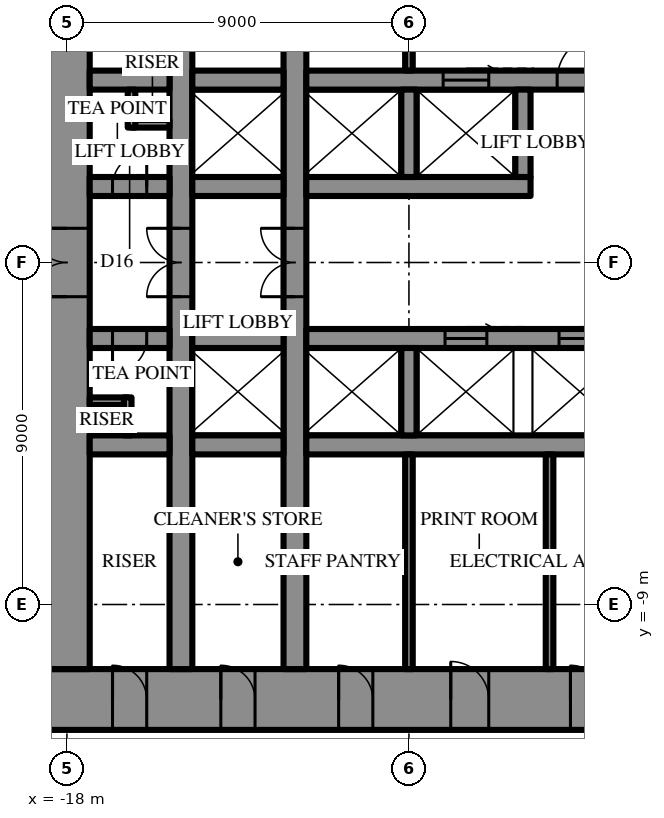
"""IFC4 building model, lengths in metres.
Left out: names, types, materials, properties, quantities, classifications, styles, units other than length and angle.
Written with IfcOpenShell. Run it as: python <this file> out.ifc"""

import sys

from ifc_helpers import new_model, si_unit, direction, frame, frame_2d, origin, place, context, subcontext, project, spatial, rectangle, extrude, element, fill, save


model = new_model("IFC4")
c1 = context("Model", 3, precision=1e-05, world=origin(), true_north=direction((0.0, 1.0)))
c2 = subcontext(c1, "Body", "Model", "MODEL_VIEW")
j1 = project(units=[si_unit("LENGTHUNIT", "METRE"), si_unit("PLANEANGLEUNIT", "RADIAN")], contexts=[c1])
p1 = place(None, origin())
s1 = spatial("IfcSite", under=j1, at=p1, CompositionType="ELEMENT")
p2 = place(p1, origin())
s2 = spatial("IfcBuilding", under=s1, at=p2, CompositionType="ELEMENT")
p3 = place(p2, frame((0.0, 0.0, 165.7)))
s3 = spatial("IfcBuildingStorey", under=s2, at=p3, CompositionType="ELEMENT", Elevation=165.7)
p4 = place(p3, frame((18.6, -11.5, 0.0), z_axis=(0.0, 0.0, 1.0), x_axis=(-1.0, 0.0, 0.0)))
e1 = element("IfcWall", 1, at=p4, inside=s3, PredefinedType="SHEAR", context=c2, shape_type="SweptSolid", body=[
    extrude(rectangle(XDim=37.2, YDim=1.6, at=frame_2d((18.6, 0.0))), origin(), (0.0, 0.0, 1.0), 4.2),
])
p5 = place(p4, frame((19.45, 0.0, 0.0)))
e2 = element("IfcOpeningElement", 2, at=p5, cuts=e1, PredefinedType="OPENING", context=c2, shape_type="SweptSolid", body=[
    extrude(rectangle(XDim=0.9, YDim=2.2, at=frame_2d((0.45, 1.1))), frame((0.0, 0.81, 0.0), z_axis=(0.0, -1.0, 0.0), x_axis=(1.0, 0.0, 0.0)), (0.0, 0.0, 1.0), 1.62),
])
p6 = place(p4, frame((22.45, 0.0, 0.0)))
e3 = element("IfcOpeningElement", 3, at=p6, cuts=e1, PredefinedType="OPENING", context=c2, shape_type="SweptSolid", body=[
    extrude(rectangle(XDim=0.9, YDim=2.2, at=frame_2d((0.45, 1.1))), frame((0.0, 0.81, 0.0), z_axis=(0.0, -1.0, 0.0), x_axis=(1.0, 0.0, 0.0)), (0.0, 0.0, 1.0), 1.62),
])
p7 = place(p4, frame((25.5, 0.0, 0.0)))
e4 = element("IfcOpeningElement", 4, at=p7, cuts=e1, PredefinedType="OPENING", context=c2, shape_type="SweptSolid", body=[
    extrude(rectangle(XDim=1.0, YDim=2.2, at=frame_2d((0.5, 1.1))), frame((0.0, 0.81, 0.0), z_axis=(0.0, -1.0, 0.0), x_axis=(1.0, 0.0, 0.0)), (0.0, 0.0, 1.0), 1.62),
])
p8 = place(p4, frame((1.8, 0.0, 0.0)))
e5 = element("IfcOpeningElement", 5, at=p8, cuts=e1, PredefinedType="OPENING", context=c2, shape_type="SweptSolid", body=[
    extrude(rectangle(XDim=0.9, YDim=2.2, at=frame_2d((0.45, 1.1))), frame((0.0, 0.81, 0.0), z_axis=(0.0, -1.0, 0.0), x_axis=(1.0, 0.0, 0.0)), (0.0, 0.0, 1.0), 1.62),
])
p9 = place(p4, frame((4.65, 0.0, 0.0)))
e6 = element("IfcOpeningElement", 6, at=p9, cuts=e1, PredefinedType="OPENING", context=c2, shape_type="SweptSolid", body=[
    extrude(rectangle(XDim=0.9, YDim=2.2, at=frame_2d((0.45, 1.1))), frame((0.0, 0.81, 0.0), z_axis=(0.0, -1.0, 0.0), x_axis=(1.0, 0.0, 0.0)), (0.0, 0.0, 1.0), 1.62),
])
p10 = place(p4, frame((7.75, 0.0, 0.0)))
e7 = element("IfcOpeningElement", 7, at=p10, cuts=e1, PredefinedType="OPENING", context=c2, shape_type="SweptSolid", body=[
    extrude(rectangle(XDim=0.9, YDim=2.2, at=frame_2d((0.45, 1.1))), frame((0.0, 0.81, 0.0), z_axis=(0.0, -1.0, 0.0), x_axis=(1.0, 0.0, 0.0)), (0.0, 0.0, 1.0), 1.62),
])
p11 = place(p4, frame((28.55, 0.0, 0.0)))
e8 = element("IfcOpeningElement", 8, at=p11, cuts=e1, PredefinedType="OPENING", context=c2, shape_type="SweptSolid", body=[
    extrude(rectangle(XDim=0.9, YDim=2.2, at=frame_2d((0.45, 1.1))), frame((0.0, 0.81, 0.0), z_axis=(0.0, -1.0, 0.0), x_axis=(1.0, 0.0, 0.0)), (0.0, 0.0, 1.0), 1.62),
])
p12 = place(p4, frame((31.65, 0.0, 0.0)))
e9 = element("IfcOpeningElement", 9, at=p12, cuts=e1, PredefinedType="OPENING", context=c2, shape_type="SweptSolid", body=[
    extrude(rectangle(XDim=0.9, YDim=2.2, at=frame_2d((0.45, 1.1))), frame((0.0, 0.81, 0.0), z_axis=(0.0, -1.0, 0.0), x_axis=(1.0, 0.0, 0.0)), (0.0, 0.0, 1.0), 1.62),
])
p13 = place(p4, frame((34.5, 0.0, 0.0)))
e10 = element("IfcOpeningElement", 10, at=p13, cuts=e1, PredefinedType="OPENING", context=c2, shape_type="SweptSolid", body=[
    extrude(rectangle(XDim=0.9, YDim=2.2, at=frame_2d((0.45, 1.1))), frame((0.0, 0.81, 0.0), z_axis=(0.0, -1.0, 0.0), x_axis=(1.0, 0.0, 0.0)), (0.0, 0.0, 1.0), 1.62),
])
p14 = place(p3, frame((-18.0, 10.7, 0.0), z_axis=(0.0, 0.0, 1.0), x_axis=(0.0, -1.0, 0.0)))
e11 = element("IfcWall", 11, at=p14, inside=s3, PredefinedType="SHEAR", context=c2, shape_type="SweptSolid", body=[
    extrude(rectangle(XDim=21.4, YDim=1.2, at=frame_2d((10.7, 0.0))), origin(), (0.0, 0.0, 1.0), 4.2),
])
p15 = place(p14, frame((9.8, 0.0, 0.0)))
e12 = element("IfcOpeningElement", 12, at=p15, cuts=e11, PredefinedType="OPENING", context=c2, shape_type="SweptSolid", body=[
    extrude(rectangle(XDim=1.8, YDim=2.4, at=frame_2d((0.9, 1.2))), frame((0.0, 0.61, 0.0), z_axis=(0.0, -1.0, 0.0), x_axis=(1.0, 0.0, 0.0)), (0.0, 0.0, 1.0), 1.22),
])
p16 = place(p3, frame((-12.0, -10.7, 0.0), z_axis=(0.0, 0.0, 1.0), x_axis=(0.0, 1.0, 0.0)))
e13 = element("IfcWall", 13, at=p16, inside=s3, PredefinedType="SHEAR", context=c2, shape_type="SweptSolid", body=[
    extrude(rectangle(XDim=21.4, YDim=0.6, at=frame_2d((10.7, 0.0))), origin(), (0.0, 0.0, 1.0), 4.2),
])
p17 = place(p16, frame((9.8, 0.0, 0.0)))
e14 = element("IfcOpeningElement", 14, at=p17, cuts=e13, PredefinedType="OPENING", context=c2, shape_type="SweptSolid", body=[
    extrude(rectangle(XDim=1.8, YDim=2.4, at=frame_2d((0.9, 1.2))), frame((0.0, 0.31, 0.0), z_axis=(0.0, -1.0, 0.0), x_axis=(1.0, 0.0, 0.0)), (0.0, 0.0, 1.0), 0.62),
])
p18 = place(p3, frame((-15.0, -10.7, 0.0), z_axis=(0.0, 0.0, 1.0), x_axis=(0.0, 1.0, 0.0)))
e15 = element("IfcWall", 15, at=p18, inside=s3, PredefinedType="SHEAR", context=c2, shape_type="SweptSolid", body=[
    extrude(rectangle(XDim=21.4, YDim=0.6, at=frame_2d((10.7, 0.0))), origin(), (0.0, 0.0, 1.0), 4.2),
])
p19 = place(p18, frame((9.8, 0.0, 0.0)))
e16 = element("IfcOpeningElement", 16, at=p19, cuts=e15, PredefinedType="OPENING", context=c2, shape_type="SweptSolid", body=[
    extrude(rectangle(XDim=1.8, YDim=2.4, at=frame_2d((0.9, 1.2))), frame((0.0, 0.31, 0.0), z_axis=(0.0, -1.0, 0.0), x_axis=(1.0, 0.0, 0.0)), (0.0, 0.0, 1.0), 0.62),
])
p20 = place(p3, frame((-17.4, 2.0, 0.0), z_axis=(0.0, 0.0, 1.0), x_axis=(1.0, 0.0, 0.0)))
e17 = element("IfcWall", 17, at=p20, inside=s3, PredefinedType="SHEAR", context=c2, shape_type="SweptSolid", body=[
    extrude(rectangle(XDim=2.1, YDim=0.5, at=frame_2d((1.05, 0.0))), origin(), (0.0, 0.0, 1.0), 4.2),
])
p21 = place(p20, frame((0.6, 0.0, 0.0)))
e18 = element("IfcOpeningElement", 18, at=p21, cuts=e17, PredefinedType="OPENING", context=c2, shape_type="SweptSolid", body=[
    extrude(rectangle(XDim=0.9, YDim=2.2, at=frame_2d((0.45, 1.1))), frame((0.0, 0.26, 0.0), z_axis=(0.0, -1.0, 0.0), x_axis=(1.0, 0.0, 0.0)), (0.0, 0.0, 1.0), 0.52),
])
p22 = place(p3, frame((-14.7, 2.0, 0.0), z_axis=(0.0, 0.0, 1.0), x_axis=(1.0, 0.0, 0.0)))
e19 = element("IfcWall", 19, at=p22, inside=s3, PredefinedType="SHEAR", context=c2, shape_type="SweptSolid", body=[
    extrude(rectangle(XDim=2.4, YDim=0.5, at=frame_2d((1.2, 0.0))), origin(), (0.0, 0.0, 1.0), 4.2),
])
p23 = place(p3, frame((-11.7, 2.0, 0.0), z_axis=(0.0, 0.0, 1.0), x_axis=(1.0, 0.0, 0.0)))
e20 = element("IfcWall", 20, at=p23, inside=s3, PredefinedType="SHEAR", context=c2, shape_type="SweptSolid", body=[
    extrude(rectangle(XDim=5.9, YDim=0.5, at=frame_2d((2.95, 0.0))), origin(), (0.0, 0.0, 1.0), 4.2),
])
p24 = place(p3, frame((-17.4, 4.8, 0.0), z_axis=(0.0, 0.0, 1.0), x_axis=(1.0, 0.0, 0.0)))
e21 = element("IfcWall", 21, at=p24, inside=s3, PredefinedType="SHEAR", context=c2, shape_type="SweptSolid", body=[
    extrude(rectangle(XDim=2.1, YDim=0.5, at=frame_2d((1.05, 0.0))), origin(), (0.0, 0.0, 1.0), 4.2),
])
p25 = place(p3, frame((-14.7, 4.8, 0.0), z_axis=(0.0, 0.0, 1.0), x_axis=(1.0, 0.0, 0.0)))
e22 = element("IfcWall", 22, at=p25, inside=s3, PredefinedType="SHEAR", context=c2, shape_type="SweptSolid", body=[
    extrude(rectangle(XDim=2.4, YDim=0.5, at=frame_2d((1.2, 0.0))), origin(), (0.0, 0.0, 1.0), 4.2),
])
p26 = place(p3, frame((-11.7, 4.8, 0.0), z_axis=(0.0, 0.0, 1.0), x_axis=(1.0, 0.0, 0.0)))
e23 = element("IfcWall", 23, at=p26, inside=s3, PredefinedType="SHEAR", context=c2, shape_type="SweptSolid", body=[
    extrude(rectangle(XDim=23.4, YDim=0.5, at=frame_2d((11.7, 0.0))), origin(), (0.0, 0.0, 1.0), 4.2),
])
p27 = place(p26, frame((6.6, 0.0, 0.0)))
e24 = element("IfcOpeningElement", 24, at=p27, cuts=e23, PredefinedType="OPENING", context=c2, shape_type="SweptSolid", body=[
    extrude(rectangle(XDim=1.2, YDim=2.2, at=frame_2d((0.6, 1.1))), frame((0.0, 0.26, 0.0), z_axis=(0.0, -1.0, 0.0), x_axis=(1.0, 0.0, 0.0)), (0.0, 0.0, 1.0), 0.52),
])
p28 = place(p26, frame((3.6, 0.0, 0.0)))
e25 = element("IfcOpeningElement", 25, at=p28, cuts=e23, PredefinedType="OPENING", context=c2, shape_type="SweptSolid", body=[
    extrude(rectangle(XDim=1.2, YDim=2.2, at=frame_2d((0.6, 1.1))), frame((0.0, 0.26, 0.0), z_axis=(0.0, -1.0, 0.0), x_axis=(1.0, 0.0, 0.0)), (0.0, 0.0, 1.0), 0.52),
])
for number, where, z_axis, x_axis in (
    (26, (-9.0, 2.25, 0.0), (0.0, 0.0, 1.0), (0.0, 1.0, 0.0)),
    (27, (-6.0, 2.25, 0.0), (0.0, 0.0, 1.0), (0.0, 1.0, 0.0)),
):
    element("IfcWall", number, at=place(p3, frame(where, z_axis=z_axis, x_axis=x_axis)), inside=s3, PredefinedType="SHEAR", context=c2, shape_type="SweptSolid", body=[
        extrude(rectangle(XDim=2.3, YDim=0.4, at=frame_2d((1.15, 0.0))), origin(), (0.0, 0.0, 1.0), 4.2),
    ])
p29 = place(p3, frame((3.2, -2.0, 0.0), z_axis=(0.0, 0.0, 1.0), x_axis=(-1.0, 0.0, 0.0)))
e28 = element("IfcWall", 28, at=p29, inside=s3, PredefinedType="SHEAR", context=c2, shape_type="SweptSolid", body=[
    extrude(rectangle(XDim=14.9, YDim=0.5, at=frame_2d((7.45, 0.0))), origin(), (0.0, 0.0, 1.0), 4.2),
])
p30 = place(p29, frame((1.15, 0.0, 0.0)))
e29 = element("IfcOpeningElement", 29, at=p30, cuts=e28, PredefinedType="OPENING", context=c2, shape_type="SweptSolid", body=[
    extrude(rectangle(XDim=1.1, YDim=2.2, at=frame_2d((0.55, 1.1))), frame((0.0, 0.26, 0.0), z_axis=(0.0, -1.0, 0.0), x_axis=(1.0, 0.0, 0.0)), (0.0, 0.0, 1.0), 0.52),
])
p31 = place(p29, frame((4.15, 0.0, 0.0)))
e30 = element("IfcOpeningElement", 30, at=p31, cuts=e28, PredefinedType="OPENING", context=c2, shape_type="SweptSolid", body=[
    extrude(rectangle(XDim=1.1, YDim=2.2, at=frame_2d((0.55, 1.1))), frame((0.0, 0.26, 0.0), z_axis=(0.0, -1.0, 0.0), x_axis=(1.0, 0.0, 0.0)), (0.0, 0.0, 1.0), 0.52),
])
p32 = place(p29, frame((7.15, 0.0, 0.0)))
e31 = element("IfcOpeningElement", 31, at=p32, cuts=e28, PredefinedType="OPENING", context=c2, shape_type="SweptSolid", body=[
    extrude(rectangle(XDim=1.1, YDim=2.2, at=frame_2d((0.55, 1.1))), frame((0.0, 0.26, 0.0), z_axis=(0.0, -1.0, 0.0), x_axis=(1.0, 0.0, 0.0)), (0.0, 0.0, 1.0), 0.52),
])
p33 = place(p29, frame((10.15, 0.0, 0.0)))
e32 = element("IfcOpeningElement", 32, at=p33, cuts=e28, PredefinedType="OPENING", context=c2, shape_type="SweptSolid", body=[
    extrude(rectangle(XDim=1.1, YDim=2.2, at=frame_2d((0.55, 1.1))), frame((0.0, 0.26, 0.0), z_axis=(0.0, -1.0, 0.0), x_axis=(1.0, 0.0, 0.0)), (0.0, 0.0, 1.0), 0.52),
])
p34 = place(p3, frame((-12.3, -2.0, 0.0), z_axis=(0.0, 0.0, 1.0), x_axis=(-1.0, 0.0, 0.0)))
e33 = element("IfcWall", 33, at=p34, inside=s3, PredefinedType="SHEAR", context=c2, shape_type="SweptSolid", body=[
    extrude(rectangle(XDim=2.4, YDim=0.5, at=frame_2d((1.2, 0.0))), origin(), (0.0, 0.0, 1.0), 4.2),
])
p35 = place(p3, frame((-15.3, -2.0, 0.0), z_axis=(0.0, 0.0, 1.0), x_axis=(-1.0, 0.0, 0.0)))
e34 = element("IfcWall", 34, at=p35, inside=s3, PredefinedType="SHEAR", context=c2, shape_type="SweptSolid", body=[
    extrude(rectangle(XDim=2.1, YDim=0.5, at=frame_2d((1.05, 0.0))), origin(), (0.0, 0.0, 1.0), 4.2),
])
p36 = place(p35, frame((0.6, 0.0, 0.0)))
e35 = element("IfcOpeningElement", 35, at=p36, cuts=e34, PredefinedType="OPENING", context=c2, shape_type="SweptSolid", body=[
    extrude(rectangle(XDim=0.9, YDim=2.2, at=frame_2d((0.45, 1.1))), frame((0.0, 0.26, 0.0), z_axis=(0.0, -1.0, 0.0), x_axis=(1.0, 0.0, 0.0)), (0.0, 0.0, 1.0), 0.52),
])
p37 = place(p3, frame((11.7, -4.8, 0.0), z_axis=(0.0, 0.0, 1.0), x_axis=(-1.0, 0.0, 0.0)))
e36 = element("IfcWall", 36, at=p37, inside=s3, PredefinedType="SHEAR", context=c2, shape_type="SweptSolid", body=[
    extrude(rectangle(XDim=23.4, YDim=0.5, at=frame_2d((11.7, 0.0))), origin(), (0.0, 0.0, 1.0), 4.2),
])
p38 = place(p37, frame((6.6, 0.0, 0.0)))
e37 = element("IfcOpeningElement", 37, at=p38, cuts=e36, PredefinedType="OPENING", context=c2, shape_type="SweptSolid", body=[
    extrude(rectangle(XDim=1.2, YDim=2.2, at=frame_2d((0.6, 1.1))), frame((0.0, 0.26, 0.0), z_axis=(0.0, -1.0, 0.0), x_axis=(1.0, 0.0, 0.0)), (0.0, 0.0, 1.0), 0.52),
])
p39 = place(p37, frame((3.6, 0.0, 0.0)))
e38 = element("IfcOpeningElement", 38, at=p39, cuts=e36, PredefinedType="OPENING", context=c2, shape_type="SweptSolid", body=[
    extrude(rectangle(XDim=1.2, YDim=2.2, at=frame_2d((0.6, 1.1))), frame((0.0, 0.26, 0.0), z_axis=(0.0, -1.0, 0.0), x_axis=(1.0, 0.0, 0.0)), (0.0, 0.0, 1.0), 0.52),
])
p40 = place(p3, frame((-12.3, -4.8, 0.0), z_axis=(0.0, 0.0, 1.0), x_axis=(-1.0, 0.0, 0.0)))
e39 = element("IfcWall", 39, at=p40, inside=s3, PredefinedType="SHEAR", context=c2, shape_type="SweptSolid", body=[
    extrude(rectangle(XDim=2.4, YDim=0.5, at=frame_2d((1.2, 0.0))), origin(), (0.0, 0.0, 1.0), 4.2),
])
p41 = place(p3, frame((-15.3, -4.8, 0.0), z_axis=(0.0, 0.0, 1.0), x_axis=(-1.0, 0.0, 0.0)))
e40 = element("IfcWall", 40, at=p41, inside=s3, PredefinedType="SHEAR", context=c2, shape_type="SweptSolid", body=[
    extrude(rectangle(XDim=2.1, YDim=0.5, at=frame_2d((1.05, 0.0))), origin(), (0.0, 0.0, 1.0), 4.2),
])
p42 = place(p3, frame((-9.0, -2.25, 0.0), z_axis=(0.0, 0.0, 1.0), x_axis=(0.0, -1.0, 0.0)))
e41 = element("IfcWall", 41, at=p42, inside=s3, PredefinedType="SHEAR", context=c2, shape_type="SweptSolid", body=[
    extrude(rectangle(XDim=2.3, YDim=0.4, at=frame_2d((1.15, 0.0))), origin(), (0.0, 0.0, 1.0), 4.2),
])
for number, where, z_axis, x_axis in (
    (42, (-9.0, 5.05, 0.0), (0.0, 0.0, 1.0), (0.0, 1.0, 0.0)),
    (43, (-9.0, -5.05, 0.0), (0.0, 0.0, 1.0), (0.0, -1.0, 0.0)),
    (44, (-5.3, -5.05, 0.0), (0.0, 0.0, 1.0), (0.0, -1.0, 0.0)),
):
    element("IfcWall", number, at=place(p3, frame(where, z_axis=z_axis, x_axis=x_axis)), inside=s3, PredefinedType="PARTITIONING", context=c2, shape_type="SweptSolid", body=[
        extrude(rectangle(XDim=5.65, YDim=0.2, at=frame_2d((2.825, 0.0))), origin(), (0.0, 0.0, 1.0), 4.0),
    ])
for number, where, z_axis, x_axis in (
    (45, (-16.3, 3.65, 0.0), (0.0, 0.0, 1.0), (1.0, 0.0, 0.0)),
    (46, (-16.3, 3.55, 0.0), (0.0, 0.0, 1.0), (0.0, 1.0, 0.0)),
    (47, (-16.4, -3.65, 0.0), (0.0, 0.0, 1.0), (-1.0, 0.0, 0.0)),
    (48, (-16.4, -3.55, 0.0), (0.0, 0.0, 1.0), (0.0, -1.0, 0.0)),
):
    element("IfcWall", number, at=place(p3, frame(where, z_axis=z_axis, x_axis=x_axis)), inside=s3, PredefinedType="PARTITIONING", context=c2, shape_type="SweptSolid", body=[
        extrude(rectangle(XDim=1.0, YDim=0.2, at=frame_2d((0.5, 0.0))), origin(), (0.0, 0.0, 1.0), 4.0),
    ])
p43 = place(p15, frame((1.8, 0.0, 0.0), z_axis=(0.0, 0.0, 1.0), x_axis=(-1.0, 0.0, 0.0)))
e49 = element("IfcDoor", 49, at=p43, inside=s3, OperationType="DOUBLE_DOOR_SINGLE_SWING", PredefinedType="DOOR", context=c2, shape_type="SweptSolid", body=[
    extrude(rectangle(XDim=1.8, YDim=2.4, at=frame_2d((0.9, 1.2))), frame((0.0, 0.025, 0.0), z_axis=(0.0, -1.0, 0.0), x_axis=(1.0, 0.0, 0.0)), (0.0, 0.0, 1.0), 0.05),
])
fill(e12, e49)
p44 = place(p27, origin())
e50 = element("IfcDoor", 50, at=p44, inside=s3, OperationType="SINGLE_SWING_LEFT", PredefinedType="DOOR", context=c2, shape_type="SweptSolid", body=[
    extrude(rectangle(XDim=1.2, YDim=2.2, at=frame_2d((0.6, 1.1))), frame((0.0, 0.025, 0.0), z_axis=(0.0, -1.0, 0.0), x_axis=(1.0, 0.0, 0.0)), (0.0, 0.0, 1.0), 0.05),
])
fill(e24, e50)
p45 = place(p6, frame((0.9, 0.0, 0.0), z_axis=(0.0, 0.0, 1.0), x_axis=(-1.0, 0.0, 0.0)))
e51 = element("IfcDoor", 51, at=p45, inside=s3, OperationType="SINGLE_SWING_RIGHT", PredefinedType="DOOR", context=c2, shape_type="SweptSolid", body=[
    extrude(rectangle(XDim=0.9, YDim=2.2, at=frame_2d((0.45, 1.1))), frame((0.0, 0.025, 0.0), z_axis=(0.0, -1.0, 0.0), x_axis=(1.0, 0.0, 0.0)), (0.0, 0.0, 1.0), 0.05),
])
fill(e3, e51)
p46 = place(p7, frame((1.0, 0.0, 0.0), z_axis=(0.0, 0.0, 1.0), x_axis=(-1.0, 0.0, 0.0)))
e52 = element("IfcDoor", 52, at=p46, inside=s3, OperationType="SINGLE_SWING_RIGHT", PredefinedType="DOOR", context=c2, shape_type="SweptSolid", body=[
    extrude(rectangle(XDim=1.0, YDim=2.2, at=frame_2d((0.5, 1.1))), frame((0.0, 0.025, 0.0), z_axis=(0.0, -1.0, 0.0), x_axis=(1.0, 0.0, 0.0)), (0.0, 0.0, 1.0), 0.05),
])
fill(e4, e52)
p47 = place(p11, frame((0.9, 0.0, 0.0), z_axis=(0.0, 0.0, 1.0), x_axis=(-1.0, 0.0, 0.0)))
e53 = element("IfcDoor", 53, at=p47, inside=s3, OperationType="SINGLE_SWING_RIGHT", PredefinedType="DOOR", context=c2, shape_type="SweptSolid", body=[
    extrude(rectangle(XDim=0.9, YDim=2.2, at=frame_2d((0.45, 1.1))), frame((0.0, 0.025, 0.0), z_axis=(0.0, -1.0, 0.0), x_axis=(1.0, 0.0, 0.0)), (0.0, 0.0, 1.0), 0.05),
])
fill(e8, e53)
p48 = place(p12, frame((0.9, 0.0, 0.0), z_axis=(0.0, 0.0, 1.0), x_axis=(-1.0, 0.0, 0.0)))
e54 = element("IfcDoor", 54, at=p48, inside=s3, OperationType="SINGLE_SWING_RIGHT", PredefinedType="DOOR", context=c2, shape_type="SweptSolid", body=[
    extrude(rectangle(XDim=0.9, YDim=2.2, at=frame_2d((0.45, 1.1))), frame((0.0, 0.025, 0.0), z_axis=(0.0, -1.0, 0.0), x_axis=(1.0, 0.0, 0.0)), (0.0, 0.0, 1.0), 0.05),
])
fill(e9, e54)
p49 = place(p13, frame((0.9, 0.0, 0.0), z_axis=(0.0, 0.0, 1.0), x_axis=(-1.0, 0.0, 0.0)))
e55 = element("IfcDoor", 55, at=p49, inside=s3, OperationType="SINGLE_SWING_RIGHT", PredefinedType="DOOR", context=c2, shape_type="SweptSolid", body=[
    extrude(rectangle(XDim=0.9, YDim=2.2, at=frame_2d((0.45, 1.1))), frame((0.0, 0.025, 0.0), z_axis=(0.0, -1.0, 0.0), x_axis=(1.0, 0.0, 0.0)), (0.0, 0.0, 1.0), 0.05),
])
fill(e10, e55)
p50 = place(p21, origin())
e56 = element("IfcDoor", 56, at=p50, inside=s3, OperationType="SINGLE_SWING_LEFT", PredefinedType="DOOR", context=c2, shape_type="SweptSolid", body=[
    extrude(rectangle(XDim=0.9, YDim=2.2, at=frame_2d((0.45, 1.1))), frame((0.0, 0.025, 0.0), z_axis=(0.0, -1.0, 0.0), x_axis=(1.0, 0.0, 0.0)), (0.0, 0.0, 1.0), 0.05),
])
fill(e18, e56)
p51 = place(p36, origin())
e57 = element("IfcDoor", 57, at=p51, inside=s3, OperationType="SINGLE_SWING_LEFT", PredefinedType="DOOR", context=c2, shape_type="SweptSolid", body=[
    extrude(rectangle(XDim=0.9, YDim=2.2, at=frame_2d((0.45, 1.1))), frame((0.0, 0.025, 0.0), z_axis=(0.0, -1.0, 0.0), x_axis=(1.0, 0.0, 0.0)), (0.0, 0.0, 1.0), 0.05),
])
fill(e35, e57)
p52 = place(p17, origin())
e58 = element("IfcDoor", 58, at=p52, inside=s3, OperationType="DOUBLE_DOOR_SINGLE_SWING", PredefinedType="DOOR", context=c2, shape_type="SweptSolid", body=[
    extrude(rectangle(XDim=1.8, YDim=2.4, at=frame_2d((0.9, 1.2))), frame((0.0, 0.025, 0.0), z_axis=(0.0, -1.0, 0.0), x_axis=(1.0, 0.0, 0.0)), (0.0, 0.0, 1.0), 0.05),
])
fill(e14, e58)
p53 = place(p19, origin())
e59 = element("IfcDoor", 59, at=p53, inside=s3, OperationType="DOUBLE_DOOR_SINGLE_SWING", PredefinedType="DOOR", context=c2, shape_type="SweptSolid", body=[
    extrude(rectangle(XDim=1.8, YDim=2.4, at=frame_2d((0.9, 1.2))), frame((0.0, 0.025, 0.0), z_axis=(0.0, -1.0, 0.0), x_axis=(1.0, 0.0, 0.0)), (0.0, 0.0, 1.0), 0.05),
])
fill(e16, e59)
p54 = place(p28, origin())
e60 = element("IfcDoor", 60, at=p54, inside=s3, OperationType="SLIDING_TO_LEFT", PredefinedType="DOOR", context=c2, shape_type="SweptSolid", body=[
    extrude(rectangle(XDim=1.2, YDim=2.2, at=frame_2d((0.6, 1.1))), frame((0.0, 0.025, 0.0), z_axis=(0.0, -1.0, 0.0), x_axis=(1.0, 0.0, 0.0)), (0.0, 0.0, 1.0), 0.05),
])
fill(e25, e60)
p55 = place(p32, frame((1.1, 0.0, 0.0), z_axis=(0.0, 0.0, 1.0), x_axis=(-1.0, 0.0, 0.0)))
e61 = element("IfcDoor", 61, at=p55, inside=s3, OperationType="SLIDING_TO_LEFT", PredefinedType="DOOR", context=c2, shape_type="SweptSolid", body=[
    extrude(rectangle(XDim=1.1, YDim=2.2, at=frame_2d((0.55, 1.1))), frame((0.0, 0.025, 0.0), z_axis=(0.0, -1.0, 0.0), x_axis=(1.0, 0.0, 0.0)), (0.0, 0.0, 1.0), 0.05),
])
fill(e31, e61)
p56 = place(p33, frame((1.1, 0.0, 0.0), z_axis=(0.0, 0.0, 1.0), x_axis=(-1.0, 0.0, 0.0)))
e62 = element("IfcDoor", 62, at=p56, inside=s3, OperationType="SLIDING_TO_LEFT", PredefinedType="DOOR", context=c2, shape_type="SweptSolid", body=[
    extrude(rectangle(XDim=1.1, YDim=2.2, at=frame_2d((0.55, 1.1))), frame((0.0, 0.025, 0.0), z_axis=(0.0, -1.0, 0.0), x_axis=(1.0, 0.0, 0.0)), (0.0, 0.0, 1.0), 0.05),
])
fill(e32, e62)
save(model, sys.argv[1])
